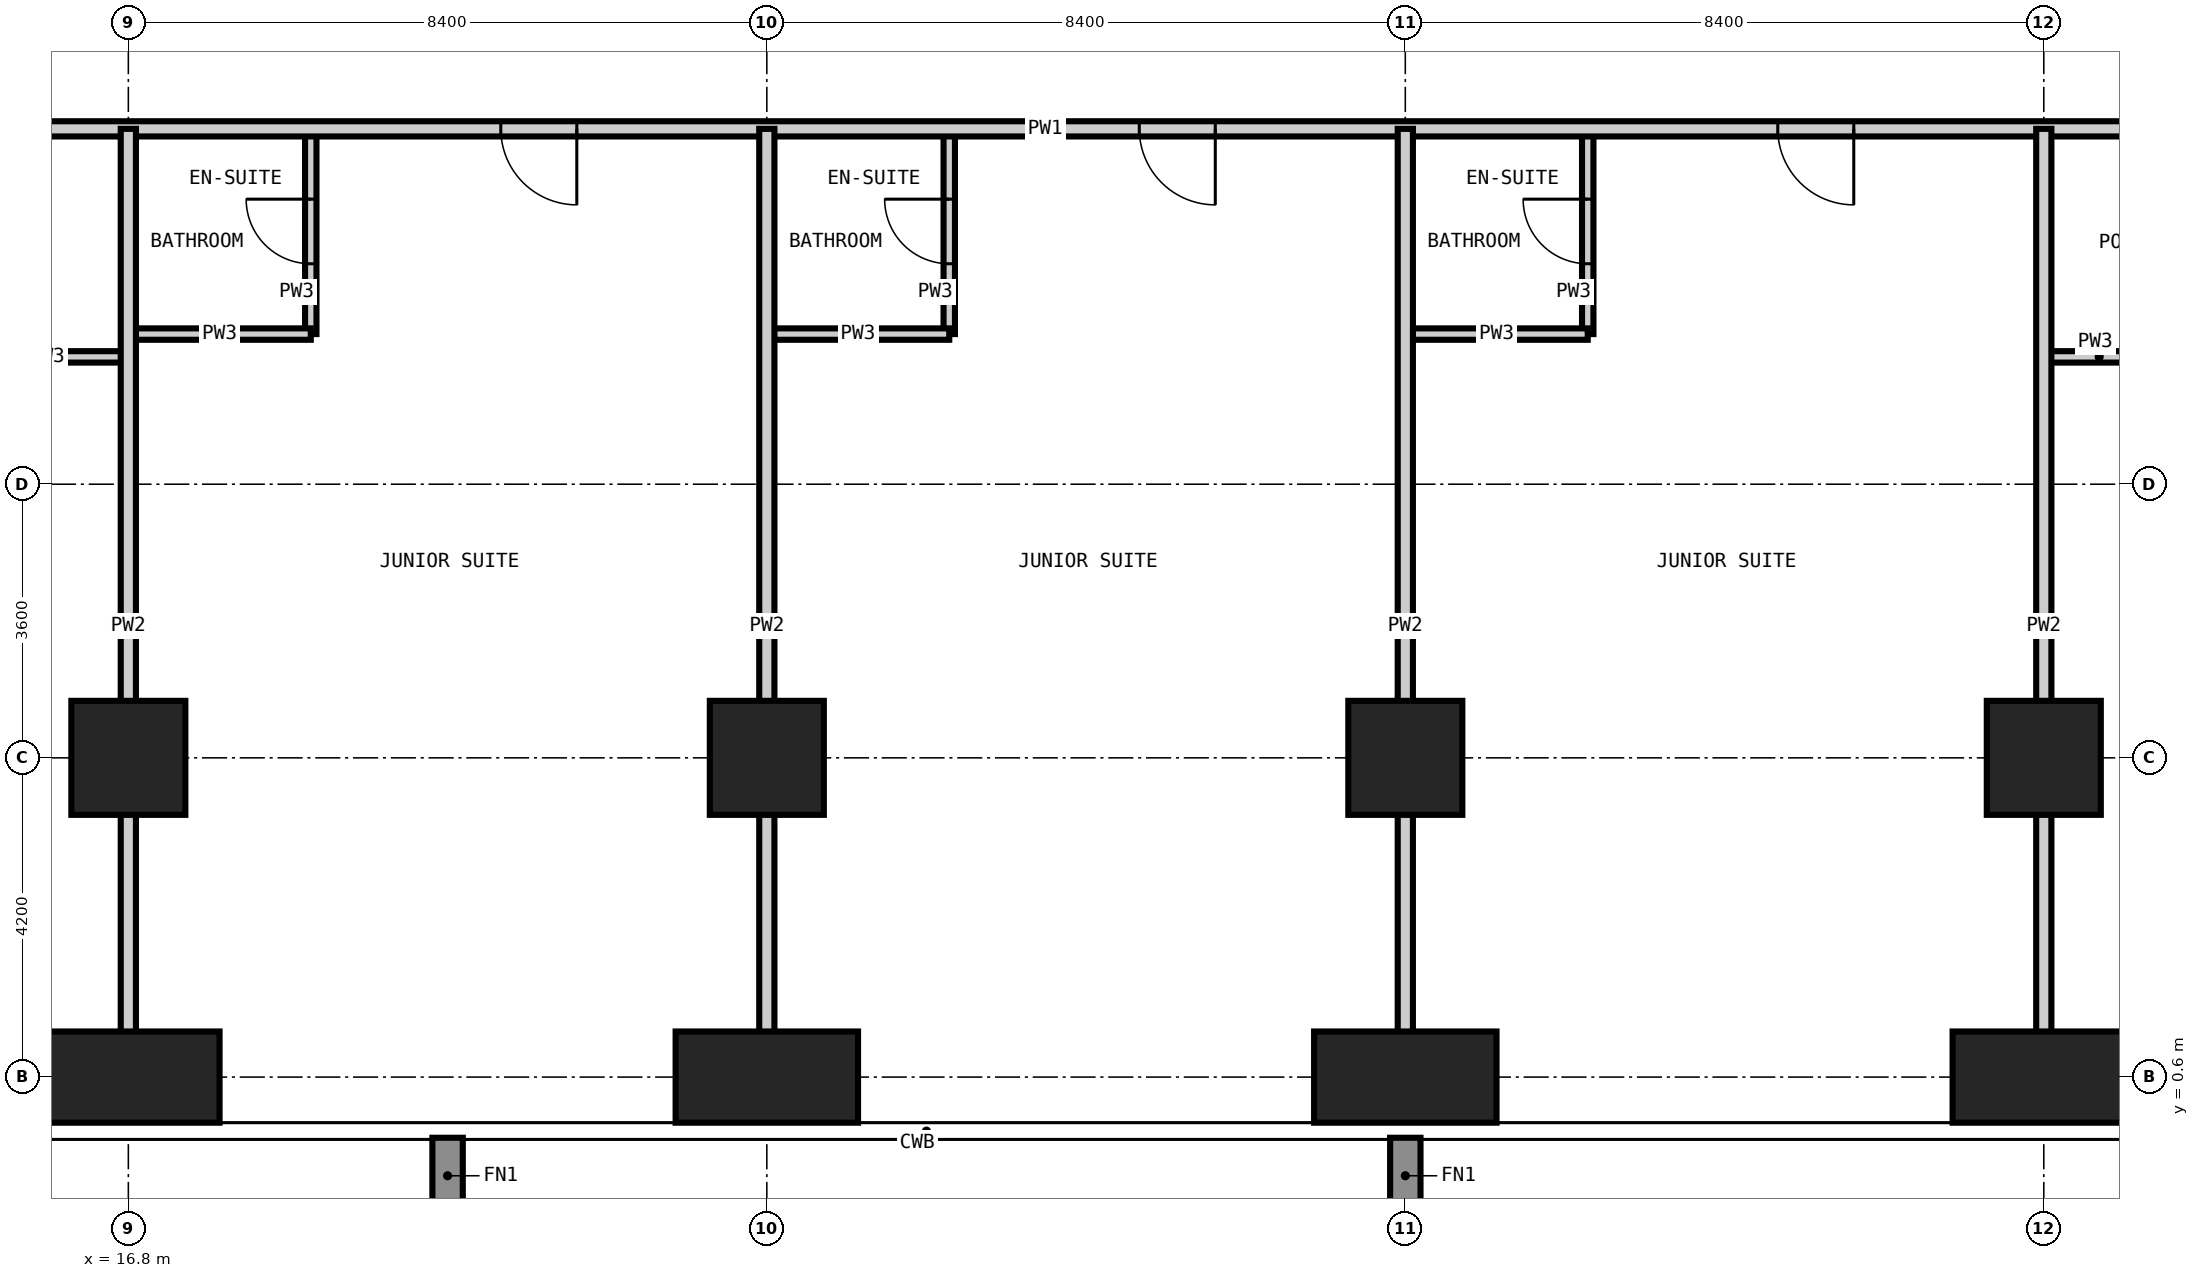
"""IFC4 building model, lengths in metres.
Left out: names, types, materials, properties, quantities, classifications, styles, units other than length and angle.
Written with IfcOpenShell. Run it as: python <this file> out.ifc"""

import sys

from ifc_helpers import new_model, si_unit, direction, frame, frame_2d, origin, origin_2d, place, context, subcontext, project, spatial, rectangle, extrude, element, fill, save


model = new_model("IFC4")
c1 = context("Model", 3, precision=1e-05, world=origin(), true_north=direction((0.0, 1.0)))
c2 = subcontext(c1, "Body", "Model", "MODEL_VIEW")
j1 = project(units=[si_unit("LENGTHUNIT", "METRE"), si_unit("PLANEANGLEUNIT", "RADIAN")], contexts=[c1])
p1 = place(None, origin())
s1 = spatial("IfcSite", under=j1, at=p1, CompositionType="ELEMENT")
p2 = place(p1, origin())
s2 = spatial("IfcBuilding", under=s1, at=p2, CompositionType="ELEMENT")
p3 = place(p2, frame((0.0, 0.0, 118.8)))
s3 = spatial("IfcBuildingStorey", under=s2, at=p3, CompositionType="ELEMENT", Elevation=118.8)
p4 = place(p3, frame((16.8, 0.6, -0.35), z_axis=(0.0, 0.0, 1.0), x_axis=(1.0, 0.0, 0.0)))
e1 = element("IfcColumn", 1, at=p4, inside=s3, PredefinedType="COLUMN", context=c2, shape_type="SweptSolid", body=[
    extrude(rectangle(XDim=2.4, YDim=1.2, at=origin_2d()), origin(), (0.0, 0.0, 1.0), 3.6),
])
p5 = place(p3, frame((16.8, 4.8, -0.35), z_axis=(0.0, 0.0, 1.0), x_axis=(1.0, 0.0, 0.0)))
e2 = element("IfcColumn", 2, at=p5, inside=s3, PredefinedType="COLUMN", context=c2, shape_type="SweptSolid", body=[
    extrude(rectangle(XDim=1.5, YDim=1.5, at=origin_2d()), origin(), (0.0, 0.0, 1.0), 3.6),
])
p6 = place(p3, frame((25.2, 0.6, -0.35), z_axis=(0.0, 0.0, 1.0), x_axis=(1.0, 0.0, 0.0)))
e3 = element("IfcColumn", 3, at=p6, inside=s3, PredefinedType="COLUMN", context=c2, shape_type="SweptSolid", body=[
    extrude(rectangle(XDim=2.4, YDim=1.2, at=origin_2d()), origin(), (0.0, 0.0, 1.0), 3.6),
])
p7 = place(p3, frame((25.2, 4.8, -0.35), z_axis=(0.0, 0.0, 1.0), x_axis=(1.0, 0.0, 0.0)))
e4 = element("IfcColumn", 4, at=p7, inside=s3, PredefinedType="COLUMN", context=c2, shape_type="SweptSolid", body=[
    extrude(rectangle(XDim=1.5, YDim=1.5, at=origin_2d()), origin(), (0.0, 0.0, 1.0), 3.6),
])
p8 = place(p3, frame((33.6, 0.6, -0.35), z_axis=(0.0, 0.0, 1.0), x_axis=(1.0, 0.0, 0.0)))
e5 = element("IfcColumn", 5, at=p8, inside=s3, PredefinedType="COLUMN", context=c2, shape_type="SweptSolid", body=[
    extrude(rectangle(XDim=2.4, YDim=1.2, at=origin_2d()), origin(), (0.0, 0.0, 1.0), 3.6),
])
p9 = place(p3, frame((33.6, 4.8, -0.35), z_axis=(0.0, 0.0, 1.0), x_axis=(1.0, 0.0, 0.0)))
e6 = element("IfcColumn", 6, at=p9, inside=s3, PredefinedType="COLUMN", context=c2, shape_type="SweptSolid", body=[
    extrude(rectangle(XDim=1.5, YDim=1.5, at=origin_2d()), origin(), (0.0, 0.0, 1.0), 3.6),
])
p10 = place(p3, frame((42.0, 0.6, -0.35), z_axis=(0.0, 0.0, 1.0), x_axis=(1.0, 0.0, 0.0)))
e7 = element("IfcColumn", 7, at=p10, inside=s3, PredefinedType="COLUMN", context=c2, shape_type="SweptSolid", body=[
    extrude(rectangle(XDim=2.4, YDim=1.2, at=origin_2d()), origin(), (0.0, 0.0, 1.0), 3.6),
])
p11 = place(p3, frame((42.0, 4.8, -0.35), z_axis=(0.0, 0.0, 1.0), x_axis=(1.0, 0.0, 0.0)))
e8 = element("IfcColumn", 8, at=p11, inside=s3, PredefinedType="COLUMN", context=c2, shape_type="SweptSolid", body=[
    extrude(rectangle(XDim=1.5, YDim=1.5, at=origin_2d()), origin(), (0.0, 0.0, 1.0), 3.6),
])
p12 = place(p3, frame((19.2, 10.375, 0.0), z_axis=(0.0, 0.0, 1.0), x_axis=(0.0, 1.0, 0.0)))
e9 = element("IfcWall", 9, at=p12, inside=s3, PredefinedType="PARTITIONING", context=c2, shape_type="SweptSolid", body=[
    extrude(rectangle(XDim=2.7, YDim=0.15, at=frame_2d((1.35, 0.0))), origin(), (0.0, 0.0, 1.0), 3.25),
])
p13 = place(p12, frame((0.925, 0.0, 0.0)))
e10 = element("IfcOpeningElement", 10, at=p13, cuts=e9, PredefinedType="OPENING", context=c2, shape_type="SweptSolid", body=[
    extrude(rectangle(XDim=0.85, YDim=2.1, at=frame_2d((0.425, 1.05))), frame((0.0, 0.085, 0.0), z_axis=(0.0, -1.0, 0.0), x_axis=(1.0, 0.0, 0.0)), (0.0, 0.0, 1.0), 0.17),
])
p14 = place(p3, frame((27.6, 10.375, 0.0), z_axis=(0.0, 0.0, 1.0), x_axis=(0.0, 1.0, 0.0)))
e11 = element("IfcWall", 11, at=p14, inside=s3, PredefinedType="PARTITIONING", context=c2, shape_type="SweptSolid", body=[
    extrude(rectangle(XDim=2.7, YDim=0.15, at=frame_2d((1.35, 0.0))), origin(), (0.0, 0.0, 1.0), 3.25),
])
p15 = place(p14, frame((0.925, 0.0, 0.0)))
e12 = element("IfcOpeningElement", 12, at=p15, cuts=e11, PredefinedType="OPENING", context=c2, shape_type="SweptSolid", body=[
    extrude(rectangle(XDim=0.85, YDim=2.1, at=frame_2d((0.425, 1.05))), frame((0.0, 0.085, 0.0), z_axis=(0.0, -1.0, 0.0), x_axis=(1.0, 0.0, 0.0)), (0.0, 0.0, 1.0), 0.17),
])
p16 = place(p3, frame((36.0, 10.375, 0.0), z_axis=(0.0, 0.0, 1.0), x_axis=(0.0, 1.0, 0.0)))
e13 = element("IfcWall", 13, at=p16, inside=s3, PredefinedType="PARTITIONING", context=c2, shape_type="SweptSolid", body=[
    extrude(rectangle(XDim=2.7, YDim=0.15, at=frame_2d((1.35, 0.0))), origin(), (0.0, 0.0, 1.0), 3.25),
])
p17 = place(p16, frame((0.925, 0.0, 0.0)))
e14 = element("IfcOpeningElement", 14, at=p17, cuts=e13, PredefinedType="OPENING", context=c2, shape_type="SweptSolid", body=[
    extrude(rectangle(XDim=0.85, YDim=2.1, at=frame_2d((0.425, 1.05))), frame((0.0, 0.085, 0.0), z_axis=(0.0, -1.0, 0.0), x_axis=(1.0, 0.0, 0.0)), (0.0, 0.0, 1.0), 0.17),
])
p18 = place(p3, frame((12.6, 10.075, 0.0), z_axis=(0.0, 0.0, 1.0), x_axis=(1.0, 0.0, 0.0)))
e15 = element("IfcWall", 15, at=p18, inside=s3, PredefinedType="PARTITIONING", context=c2, shape_type="SweptSolid", body=[
    extrude(rectangle(XDim=4.2, YDim=0.15, at=frame_2d((2.1, 0.0))), origin(), (0.0, 0.0, 1.0), 3.25),
])
p19 = place(p18, frame((1.675, 0.0, 0.0)))
e16 = element("IfcOpeningElement", 16, at=p19, cuts=e15, PredefinedType="OPENING", context=c2, shape_type="SweptSolid", body=[
    extrude(rectangle(XDim=0.85, YDim=2.1, at=frame_2d((0.425, 1.05))), frame((0.0, 0.085, 0.0), z_axis=(0.0, -1.0, 0.0), x_axis=(1.0, 0.0, 0.0)), (0.0, 0.0, 1.0), 0.17),
])
p20 = place(p3, frame((42.0, 10.075, 0.0), z_axis=(0.0, 0.0, 1.0), x_axis=(1.0, 0.0, 0.0)))
e17 = element("IfcWall", 17, at=p20, inside=s3, PredefinedType="PARTITIONING", context=c2, shape_type="SweptSolid", body=[
    extrude(rectangle(XDim=3.125, YDim=0.15, at=frame_2d((1.562, 0.0))), origin(), (0.0, 0.0, 1.0), 3.25),
])
p21 = place(p20, frame((1.138, 0.0, 0.0)))
e18 = element("IfcOpeningElement", 18, at=p21, cuts=e17, PredefinedType="OPENING", context=c2, shape_type="SweptSolid", body=[
    extrude(rectangle(XDim=0.85, YDim=2.1, at=frame_2d((0.425, 1.05))), frame((0.0, 0.085, 0.0), z_axis=(0.0, -1.0, 0.0), x_axis=(1.0, 0.0, 0.0)), (0.0, 0.0, 1.0), 0.17),
])
p22 = place(p3, frame((16.8, 10.375, 0.0), z_axis=(0.0, 0.0, 1.0), x_axis=(1.0, 0.0, 0.0)))
e19 = element("IfcWall", 19, at=p22, inside=s3, PredefinedType="PARTITIONING", context=c2, shape_type="SweptSolid", body=[
    extrude(rectangle(XDim=2.4, YDim=0.15, at=frame_2d((1.2, 0.0))), origin(), (0.0, 0.0, 1.0), 3.25),
])
p23 = place(p3, frame((25.2, 10.375, 0.0), z_axis=(0.0, 0.0, 1.0), x_axis=(1.0, 0.0, 0.0)))
e20 = element("IfcWall", 20, at=p23, inside=s3, PredefinedType="PARTITIONING", context=c2, shape_type="SweptSolid", body=[
    extrude(rectangle(XDim=2.4, YDim=0.15, at=frame_2d((1.2, 0.0))), origin(), (0.0, 0.0, 1.0), 3.25),
])
p24 = place(p3, frame((33.6, 10.375, 0.0), z_axis=(0.0, 0.0, 1.0), x_axis=(1.0, 0.0, 0.0)))
e21 = element("IfcWall", 21, at=p24, inside=s3, PredefinedType="PARTITIONING", context=c2, shape_type="SweptSolid", body=[
    extrude(rectangle(XDim=2.4, YDim=0.15, at=frame_2d((1.2, 0.0))), origin(), (0.0, 0.0, 1.0), 3.25),
])
p25 = place(p3, frame((45.125, 13.075, 0.0), z_axis=(0.0, 0.0, 1.0), x_axis=(-1.0, 0.0, 0.0)))
e22 = element("IfcWall", 22, at=p25, inside=s3, PredefinedType="PARTITIONING", context=c2, shape_type="SweptSolid", body=[
    extrude(rectangle(XDim=32.525, YDim=0.2, at=frame_2d((16.262, 0.0))), origin(), (0.0, 0.0, 1.0), 3.25),
])
p26 = place(p25, frame((22.425, 0.0, 0.0)))
e23 = element("IfcOpeningElement", 23, at=p26, cuts=e22, PredefinedType="OPENING", context=c2, shape_type="SweptSolid", body=[
    extrude(rectangle(XDim=1.0, YDim=2.2, at=frame_2d((0.5, 1.1))), frame((0.0, 0.11, 0.0), z_axis=(0.0, -1.0, 0.0), x_axis=(1.0, 0.0, 0.0)), (0.0, 0.0, 1.0), 0.22),
])
p27 = place(p25, frame((14.025, 0.0, 0.0)))
e24 = element("IfcOpeningElement", 24, at=p27, cuts=e22, PredefinedType="OPENING", context=c2, shape_type="SweptSolid", body=[
    extrude(rectangle(XDim=1.0, YDim=2.2, at=frame_2d((0.5, 1.1))), frame((0.0, 0.11, 0.0), z_axis=(0.0, -1.0, 0.0), x_axis=(1.0, 0.0, 0.0)), (0.0, 0.0, 1.0), 0.22),
])
p28 = place(p25, frame((5.625, 0.0, 0.0)))
e25 = element("IfcOpeningElement", 25, at=p28, cuts=e22, PredefinedType="OPENING", context=c2, shape_type="SweptSolid", body=[
    extrude(rectangle(XDim=1.0, YDim=2.2, at=frame_2d((0.5, 1.1))), frame((0.0, 0.11, 0.0), z_axis=(0.0, -1.0, 0.0), x_axis=(1.0, 0.0, 0.0)), (0.0, 0.0, 1.0), 0.22),
])
for number, where, z_axis, x_axis in (
    (26, (16.8, -0.018, 0.0), (0.0, 0.0, 1.0), (0.0, 1.0, 0.0)),
    (27, (25.2, -0.018, 0.0), (0.0, 0.0, 1.0), (0.0, 1.0, 0.0)),
    (28, (33.6, -0.018, 0.0), (0.0, 0.0, 1.0), (0.0, 1.0, 0.0)),
    (29, (42.0, -0.018, 0.0), (0.0, 0.0, 1.0), (0.0, 1.0, 0.0)),
):
    element("IfcWall", number, at=place(p3, frame(where, z_axis=z_axis, x_axis=x_axis)), inside=s3, PredefinedType="PARTITIONING", context=c2, shape_type="SweptSolid", body=[
        extrude(rectangle(XDim=13.093, YDim=0.2, at=frame_2d((6.546, 0.0))), origin(), (0.0, 0.0, 1.0), 3.25),
    ])
p29 = place(p26, origin())
e30 = element("IfcDoor", 30, at=p29, inside=s3, OperationType="SINGLE_SWING_LEFT", PredefinedType="DOOR", context=c2, shape_type="SweptSolid", body=[
    extrude(rectangle(XDim=1.0, YDim=2.2, at=frame_2d((0.5, 1.1))), frame((0.0, 0.025, 0.0), z_axis=(0.0, -1.0, 0.0), x_axis=(1.0, 0.0, 0.0)), (0.0, 0.0, 1.0), 0.05),
])
fill(e23, e30)
p30 = place(p13, origin())
e31 = element("IfcDoor", 31, at=p30, inside=s3, OperationType="SINGLE_SWING_RIGHT", PredefinedType="DOOR", context=c2, shape_type="SweptSolid", body=[
    extrude(rectangle(XDim=0.85, YDim=2.1, at=frame_2d((0.425, 1.05))), frame((0.0, 0.025, 0.0), z_axis=(0.0, -1.0, 0.0), x_axis=(1.0, 0.0, 0.0)), (0.0, 0.0, 1.0), 0.05),
])
fill(e10, e31)
p31 = place(p27, origin())
e32 = element("IfcDoor", 32, at=p31, inside=s3, OperationType="SINGLE_SWING_LEFT", PredefinedType="DOOR", context=c2, shape_type="SweptSolid", body=[
    extrude(rectangle(XDim=1.0, YDim=2.2, at=frame_2d((0.5, 1.1))), frame((0.0, 0.025, 0.0), z_axis=(0.0, -1.0, 0.0), x_axis=(1.0, 0.0, 0.0)), (0.0, 0.0, 1.0), 0.05),
])
fill(e24, e32)
p32 = place(p15, origin())
e33 = element("IfcDoor", 33, at=p32, inside=s3, OperationType="SINGLE_SWING_RIGHT", PredefinedType="DOOR", context=c2, shape_type="SweptSolid", body=[
    extrude(rectangle(XDim=0.85, YDim=2.1, at=frame_2d((0.425, 1.05))), frame((0.0, 0.025, 0.0), z_axis=(0.0, -1.0, 0.0), x_axis=(1.0, 0.0, 0.0)), (0.0, 0.0, 1.0), 0.05),
])
fill(e12, e33)
p33 = place(p28, origin())
e34 = element("IfcDoor", 34, at=p33, inside=s3, OperationType="SINGLE_SWING_LEFT", PredefinedType="DOOR", context=c2, shape_type="SweptSolid", body=[
    extrude(rectangle(XDim=1.0, YDim=2.2, at=frame_2d((0.5, 1.1))), frame((0.0, 0.025, 0.0), z_axis=(0.0, -1.0, 0.0), x_axis=(1.0, 0.0, 0.0)), (0.0, 0.0, 1.0), 0.05),
])
fill(e25, e34)
p34 = place(p17, origin())
e35 = element("IfcDoor", 35, at=p34, inside=s3, OperationType="SINGLE_SWING_RIGHT", PredefinedType="DOOR", context=c2, shape_type="SweptSolid", body=[
    extrude(rectangle(XDim=0.85, YDim=2.1, at=frame_2d((0.425, 1.05))), frame((0.0, 0.025, 0.0), z_axis=(0.0, -1.0, 0.0), x_axis=(1.0, 0.0, 0.0)), (0.0, 0.0, 1.0), 0.05),
])
fill(e14, e35)
save(model, sys.argv[1])
